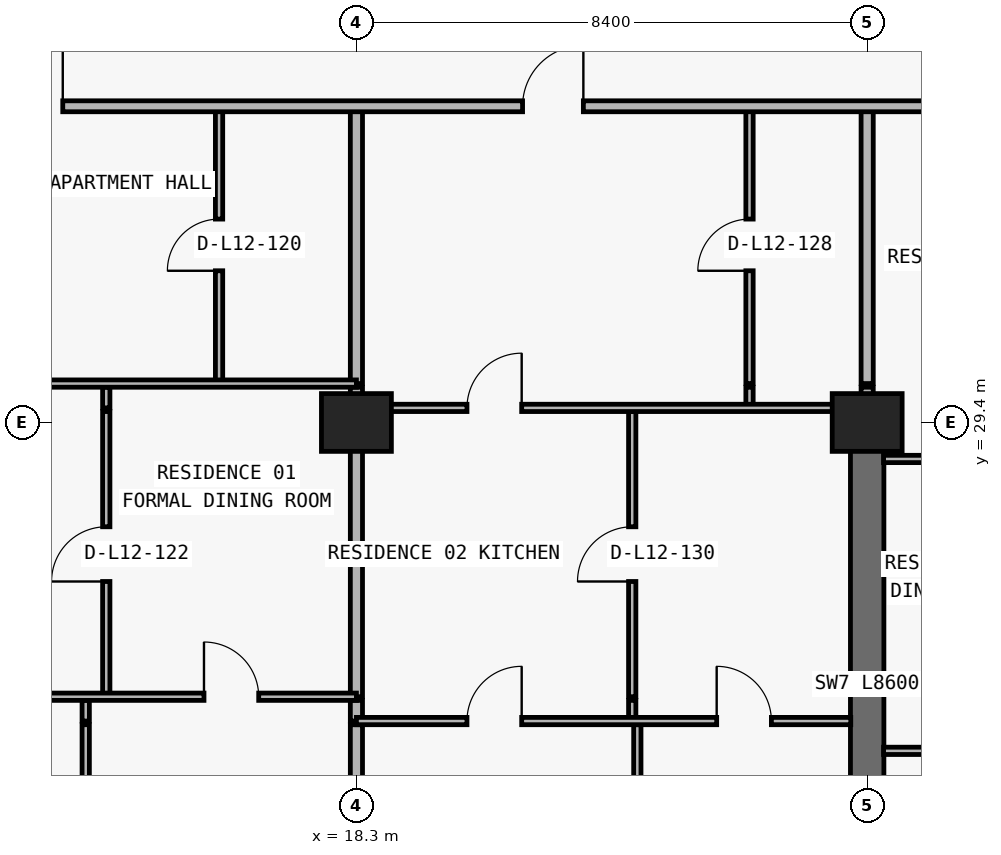
"""IFC4 building model, lengths in metres.
Left out: names, types, materials, properties, quantities, classifications, styles, units other than length and angle.
Written with IfcOpenShell. Run it as: python <this file> out.ifc"""

import sys

from ifc_helpers import new_model, si_unit, direction, frame, frame_2d, origin, origin_2d, place, context, subcontext, project, spatial, rectangle, extrude, element, fill, save


model = new_model("IFC4")
c1 = context("Model", 3, precision=1e-05, world=origin(), true_north=direction((0.0, 1.0)))
c2 = subcontext(c1, "Body", "Model", "MODEL_VIEW")
j1 = project(units=[si_unit("LENGTHUNIT", "METRE"), si_unit("PLANEANGLEUNIT", "RADIAN")], contexts=[c1])
p1 = place(None, origin())
s1 = spatial("IfcSite", under=j1, at=p1, CompositionType="ELEMENT")
p2 = place(p1, origin())
s2 = spatial("IfcBuilding", under=s1, at=p2, CompositionType="ELEMENT")
p3 = place(p2, frame((0.0, 0.0, 49.8)))
s3 = spatial("IfcBuildingStorey", under=s2, at=p3, CompositionType="ELEMENT", Elevation=49.8)
for number, where, z_axis, x_axis in (
    (1, (18.3, 29.4, 0.0), (0.0, 0.0, 1.0), (1.0, 0.0, 0.0)),
    (2, (26.7, 29.4, 0.0), (0.0, 0.0, 1.0), (1.0, 0.0, 0.0)),
):
    element("IfcColumn", number, at=place(p3, frame(where, z_axis=z_axis, x_axis=x_axis)), inside=s3, PredefinedType="COLUMN", context=c2, shape_type="SweptSolid", body=[
        extrude(rectangle(XDim=1.15, YDim=0.95, at=origin_2d()), origin(), (0.0, 0.0, 1.0), 3.05),
    ])
p4 = place(p3, frame((26.7, 20.8, 0.0), z_axis=(0.0, 0.0, 1.0), x_axis=(0.0, 1.0, 0.0)))
e3 = element("IfcWall", 3, at=p4, inside=s3, PredefinedType="SHEAR", context=c2, shape_type="SweptSolid", body=[
    extrude(rectangle(XDim=8.6, YDim=0.55, at=frame_2d((4.3, 0.0))), origin(), (0.0, 0.0, 1.0), 3.05),
])
p5 = place(p3, frame((13.848, 6.24, 0.0), z_axis=(0.0, 0.0, 1.0), x_axis=(0.0, 1.0, 0.0)))
e4 = element("IfcWall", 4, at=p5, inside=s3, PredefinedType="PARTITIONING", context=c2, shape_type="SweptSolid", body=[
    extrude(rectangle(XDim=18.19, YDim=0.12, at=frame_2d((9.095, 0.0))), origin(), (0.0, 0.0, 1.0), 3.05),
])
p6 = place(p3, frame((13.848, 24.49, 0.0), z_axis=(0.0, 0.0, 1.0), x_axis=(0.0, 1.0, 0.0)))
e5 = element("IfcWall", 5, at=p6, inside=s3, PredefinedType="PARTITIONING", context=c2, shape_type="SweptSolid", body=[
    extrude(rectangle(XDim=0.34, YDim=0.12, at=frame_2d((0.17, 0.0))), origin(), (0.0, 0.0, 1.0), 3.05),
])
p7 = place(p3, frame((14.186, 24.89, 0.0), z_axis=(0.0, 0.0, 1.0), x_axis=(0.0, 1.0, 0.0)))
e6 = element("IfcWall", 6, at=p7, inside=s3, PredefinedType="PARTITIONING", context=c2, shape_type="SweptSolid", body=[
    extrude(rectangle(XDim=4.69, YDim=0.12, at=frame_2d((2.345, 0.0))), origin(), (0.0, 0.0, 1.0), 3.05),
])
p8 = place(p7, frame((1.895, 0.0, 0.0)))
e7 = element("IfcOpeningElement", 7, at=p8, cuts=e6, PredefinedType="OPENING", context=c2, shape_type="SweptSolid", body=[
    extrude(rectangle(XDim=0.9, YDim=2.15, at=frame_2d((0.45, 1.075))), frame((0.0, 0.07, 0.0), z_axis=(0.0, -1.0, 0.0), x_axis=(1.0, 0.0, 0.0)), (0.0, 0.0, 1.0), 0.14),
])
p9 = place(p3, frame((14.186, 29.64, 0.0), z_axis=(0.0, 0.0, 1.0), x_axis=(0.0, 1.0, 0.0)))
e8 = element("IfcWall", 8, at=p9, inside=s3, PredefinedType="PARTITIONING", context=c2, shape_type="SweptSolid", body=[
    extrude(rectangle(XDim=0.34, YDim=0.12, at=frame_2d((0.17, 0.0))), origin(), (0.0, 0.0, 1.0), 3.05),
])
p10 = place(p3, frame((16.041, 30.04, 0.0), z_axis=(0.0, 0.0, 1.0), x_axis=(0.0, 1.0, 0.0)))
e9 = element("IfcWall", 9, at=p10, inside=s3, PredefinedType="PARTITIONING", context=c2, shape_type="SweptSolid", body=[
    extrude(rectangle(XDim=4.56, YDim=0.12, at=frame_2d((2.28, 0.0))), origin(), (0.0, 0.0, 1.0), 3.05),
])
p11 = place(p10, frame((1.855, 0.0, 0.0)))
e10 = element("IfcOpeningElement", 10, at=p11, cuts=e9, PredefinedType="OPENING", context=c2, shape_type="SweptSolid", body=[
    extrude(rectangle(XDim=0.85, YDim=2.1, at=frame_2d((0.425, 1.05))), frame((0.0, 0.07, 0.0), z_axis=(0.0, -1.0, 0.0), x_axis=(1.0, 0.0, 0.0)), (0.0, 0.0, 1.0), 0.14),
])
p12 = place(p3, frame((18.3, 6.24, 0.0), z_axis=(0.0, 0.0, 1.0), x_axis=(0.0, 1.0, 0.0)))
e11 = element("IfcWall", 11, at=p12, inside=s3, PredefinedType="PARTITIONING", context=c2, shape_type="SweptSolid", body=[
    extrude(rectangle(XDim=18.19, YDim=0.2, at=frame_2d((9.095, 0.0))), origin(), (0.0, 0.0, 1.0), 2.11),
])
p13 = place(p3, frame((18.3, 24.49, 0.0), z_axis=(0.0, 0.0, 1.0), x_axis=(0.0, 1.0, 0.0)))
e12 = element("IfcWall", 12, at=p13, inside=s3, PredefinedType="PARTITIONING", context=c2, shape_type="SweptSolid", body=[
    extrude(rectangle(XDim=0.34, YDim=0.2, at=frame_2d((0.17, 0.0))), origin(), (0.0, 0.0, 1.0), 2.11),
])
p14 = place(p3, frame((18.3, 24.89, 0.0), z_axis=(0.0, 0.0, 1.0), x_axis=(0.0, 1.0, 0.0)))
e13 = element("IfcWall", 13, at=p14, inside=s3, PredefinedType="PARTITIONING", context=c2, shape_type="SweptSolid", body=[
    extrude(rectangle(XDim=4.69, YDim=0.2, at=frame_2d((2.345, 0.0))), origin(), (0.0, 0.0, 1.0), 2.11),
])
p15 = place(p3, frame((18.3, 29.64, 0.0), z_axis=(0.0, 0.0, 1.0), x_axis=(0.0, 1.0, 0.0)))
e14 = element("IfcWall", 14, at=p15, inside=s3, PredefinedType="PARTITIONING", context=c2, shape_type="SweptSolid", body=[
    extrude(rectangle(XDim=0.34, YDim=0.2, at=frame_2d((0.17, 0.0))), origin(), (0.0, 0.0, 1.0), 2.11),
])
p16 = place(p3, frame((18.3, 30.04, 0.0), z_axis=(0.0, 0.0, 1.0), x_axis=(0.0, 1.0, 0.0)))
e15 = element("IfcWall", 15, at=p16, inside=s3, PredefinedType="PARTITIONING", context=c2, shape_type="SweptSolid", body=[
    extrude(rectangle(XDim=4.56, YDim=0.2, at=frame_2d((2.28, 0.0))), origin(), (0.0, 0.0, 1.0), 2.11),
])
p17 = place(p3, frame((22.836, 24.49, 0.0), z_axis=(0.0, 0.0, 1.0), x_axis=(0.0, 1.0, 0.0)))
e16 = element("IfcWall", 16, at=p17, inside=s3, PredefinedType="PARTITIONING", context=c2, shape_type="SweptSolid", body=[
    extrude(rectangle(XDim=0.34, YDim=0.12, at=frame_2d((0.17, 0.0))), origin(), (0.0, 0.0, 1.0), 3.05),
])
p18 = place(p3, frame((22.836, 24.89, 0.0), z_axis=(0.0, 0.0, 1.0), x_axis=(0.0, 1.0, 0.0)))
e17 = element("IfcWall", 17, at=p18, inside=s3, PredefinedType="PARTITIONING", context=c2, shape_type="SweptSolid", body=[
    extrude(rectangle(XDim=4.69, YDim=0.12, at=frame_2d((2.345, 0.0))), origin(), (0.0, 0.0, 1.0), 3.05),
])
p19 = place(p18, frame((1.895, 0.0, 0.0)))
e18 = element("IfcOpeningElement", 18, at=p19, cuts=e17, PredefinedType="OPENING", context=c2, shape_type="SweptSolid", body=[
    extrude(rectangle(XDim=0.9, YDim=2.15, at=frame_2d((0.45, 1.075))), frame((0.0, 0.07, 0.0), z_axis=(0.0, -1.0, 0.0), x_axis=(1.0, 0.0, 0.0)), (0.0, 0.0, 1.0), 0.14),
])
p20 = place(p3, frame((22.92, 6.24, 0.0), z_axis=(0.0, 0.0, 1.0), x_axis=(0.0, 1.0, 0.0)))
e19 = element("IfcWall", 19, at=p20, inside=s3, PredefinedType="PARTITIONING", context=c2, shape_type="SweptSolid", body=[
    extrude(rectangle(XDim=18.19, YDim=0.12, at=frame_2d((9.095, 0.0))), origin(), (0.0, 0.0, 1.0), 3.05),
])
p21 = place(p3, frame((24.765, 29.64, 0.0), z_axis=(0.0, 0.0, 1.0), x_axis=(0.0, 1.0, 0.0)))
e20 = element("IfcWall", 20, at=p21, inside=s3, PredefinedType="PARTITIONING", context=c2, shape_type="SweptSolid", body=[
    extrude(rectangle(XDim=0.34, YDim=0.12, at=frame_2d((0.17, 0.0))), origin(), (0.0, 0.0, 1.0), 3.05),
])
p22 = place(p3, frame((24.765, 30.04, 0.0), z_axis=(0.0, 0.0, 1.0), x_axis=(0.0, 1.0, 0.0)))
e21 = element("IfcWall", 21, at=p22, inside=s3, PredefinedType="PARTITIONING", context=c2, shape_type="SweptSolid", body=[
    extrude(rectangle(XDim=4.56, YDim=0.12, at=frame_2d((2.28, 0.0))), origin(), (0.0, 0.0, 1.0), 3.05),
])
p23 = place(p22, frame((1.855, 0.0, 0.0)))
e22 = element("IfcOpeningElement", 22, at=p23, cuts=e21, PredefinedType="OPENING", context=c2, shape_type="SweptSolid", body=[
    extrude(rectangle(XDim=0.85, YDim=2.1, at=frame_2d((0.425, 1.05))), frame((0.0, 0.07, 0.0), z_axis=(0.0, -1.0, 0.0), x_axis=(1.0, 0.0, 0.0)), (0.0, 0.0, 1.0), 0.14),
])
p24 = place(p3, frame((26.7, 29.64, 0.0), z_axis=(0.0, 0.0, 1.0), x_axis=(0.0, 1.0, 0.0)))
e23 = element("IfcWall", 23, at=p24, inside=s3, PredefinedType="PARTITIONING", context=c2, shape_type="SweptSolid", body=[
    extrude(rectangle(XDim=0.34, YDim=0.2, at=frame_2d((0.17, 0.0))), origin(), (0.0, 0.0, 1.0), 2.335),
])
p25 = place(p3, frame((26.7, 30.04, 0.0), z_axis=(0.0, 0.0, 1.0), x_axis=(0.0, 1.0, 0.0)))
e24 = element("IfcWall", 24, at=p25, inside=s3, PredefinedType="PARTITIONING", context=c2, shape_type="SweptSolid", body=[
    extrude(rectangle(XDim=4.56, YDim=0.2, at=frame_2d((2.28, 0.0))), origin(), (0.0, 0.0, 1.0), 2.335),
])
p26 = place(p3, frame((26.97, 24.0, 0.0), z_axis=(0.0, 0.0, 1.0), x_axis=(1.0, 0.0, 0.0)))
e25 = element("IfcWall", 25, at=p26, inside=s3, PredefinedType="PARTITIONING", context=c2, shape_type="SweptSolid", body=[
    extrude(rectangle(XDim=8.13, YDim=0.12, at=frame_2d((4.065, 0.0))), origin(), (0.0, 0.0, 1.0), 3.05),
])
p27 = place(p26, frame((1.305, 0.0, 0.0)))
e26 = element("IfcOpeningElement", 26, at=p27, cuts=e25, PredefinedType="OPENING", context=c2, shape_type="SweptSolid", body=[
    extrude(rectangle(XDim=0.9, YDim=2.15, at=frame_2d((0.45, 1.075))), frame((0.0, 0.07, 0.0), z_axis=(0.0, -1.0, 0.0), x_axis=(1.0, 0.0, 0.0)), (0.0, 0.0, 1.0), 0.14),
])
p28 = place(p3, frame((18.3, 24.49, 0.0), z_axis=(0.0, 0.0, 1.0), x_axis=(1.0, 0.0, 0.0)))
e27 = element("IfcWall", 27, at=p28, inside=s3, PredefinedType="PARTITIONING", context=c2, shape_type="SweptSolid", body=[
    extrude(rectangle(XDim=8.13, YDim=0.12, at=frame_2d((4.065, 0.0))), origin(), (0.0, 0.0, 1.0), 3.05),
])
p29 = place(p28, frame((1.818, 0.0, 0.0)))
e28 = element("IfcOpeningElement", 28, at=p29, cuts=e27, PredefinedType="OPENING", context=c2, shape_type="SweptSolid", body=[
    extrude(rectangle(XDim=0.9, YDim=2.15, at=frame_2d((0.45, 1.075))), frame((0.0, 0.07, 0.0), z_axis=(0.0, -1.0, 0.0), x_axis=(1.0, 0.0, 0.0)), (0.0, 0.0, 1.0), 0.14),
])
p30 = place(p28, frame((5.925, 0.0, 0.0)))
e29 = element("IfcOpeningElement", 29, at=p30, cuts=e27, PredefinedType="OPENING", context=c2, shape_type="SweptSolid", body=[
    extrude(rectangle(XDim=0.9, YDim=2.15, at=frame_2d((0.45, 1.075))), frame((0.0, 0.07, 0.0), z_axis=(0.0, -1.0, 0.0), x_axis=(1.0, 0.0, 0.0)), (0.0, 0.0, 1.0), 0.14),
])
p31 = place(p3, frame((9.9, 24.89, 0.0), z_axis=(0.0, 0.0, 1.0), x_axis=(1.0, 0.0, 0.0)))
e30 = element("IfcWall", 30, at=p31, inside=s3, PredefinedType="PARTITIONING", context=c2, shape_type="SweptSolid", body=[
    extrude(rectangle(XDim=8.4, YDim=0.12, at=frame_2d((4.2, 0.0))), origin(), (0.0, 0.0, 1.0), 3.05),
])
p32 = place(p31, frame((1.524, 0.0, 0.0)))
e31 = element("IfcOpeningElement", 31, at=p32, cuts=e30, PredefinedType="OPENING", context=c2, shape_type="SweptSolid", body=[
    extrude(rectangle(XDim=0.9, YDim=2.15, at=frame_2d((0.45, 1.075))), frame((0.0, 0.07, 0.0), z_axis=(0.0, -1.0, 0.0), x_axis=(1.0, 0.0, 0.0)), (0.0, 0.0, 1.0), 0.14),
])
p33 = place(p31, frame((5.893, 0.0, 0.0)))
e32 = element("IfcOpeningElement", 32, at=p33, cuts=e30, PredefinedType="OPENING", context=c2, shape_type="SweptSolid", body=[
    extrude(rectangle(XDim=0.9, YDim=2.15, at=frame_2d((0.45, 1.075))), frame((0.0, 0.07, 0.0), z_axis=(0.0, -1.0, 0.0), x_axis=(1.0, 0.0, 0.0)), (0.0, 0.0, 1.0), 0.14),
])
p34 = place(p3, frame((26.97, 28.8, 0.0), z_axis=(0.0, 0.0, 1.0), x_axis=(1.0, 0.0, 0.0)))
e33 = element("IfcWall", 33, at=p34, inside=s3, PredefinedType="PARTITIONING", context=c2, shape_type="SweptSolid", body=[
    extrude(rectangle(XDim=8.125, YDim=0.12, at=frame_2d((4.062, 0.0))), origin(), (0.0, 0.0, 1.0), 3.05),
])
p35 = place(p34, frame((1.305, 0.0, 0.0)))
e34 = element("IfcOpeningElement", 34, at=p35, cuts=e33, PredefinedType="OPENING", context=c2, shape_type="SweptSolid", body=[
    extrude(rectangle(XDim=0.9, YDim=2.15, at=frame_2d((0.45, 1.075))), frame((0.0, 0.07, 0.0), z_axis=(0.0, -1.0, 0.0), x_axis=(1.0, 0.0, 0.0)), (0.0, 0.0, 1.0), 0.14),
])
p36 = place(p3, frame((18.3, 29.64, 0.0), z_axis=(0.0, 0.0, 1.0), x_axis=(1.0, 0.0, 0.0)))
e35 = element("IfcWall", 35, at=p36, inside=s3, PredefinedType="PARTITIONING", context=c2, shape_type="SweptSolid", body=[
    extrude(rectangle(XDim=8.4, YDim=0.12, at=frame_2d((4.2, 0.0))), origin(), (0.0, 0.0, 1.0), 2.11),
])
p37 = place(p36, frame((1.818, 0.0, 0.0)))
e36 = element("IfcOpeningElement", 36, at=p37, cuts=e35, PredefinedType="OPENING", context=c2, shape_type="SweptSolid", body=[
    extrude(rectangle(XDim=0.9, YDim=2.06, at=frame_2d((0.45, 1.03))), frame((0.0, 0.07, 0.0), z_axis=(0.0, -1.0, 0.0), x_axis=(1.0, 0.0, 0.0)), (0.0, 0.0, 1.0), 0.14),
])
p38 = place(p3, frame((9.9, 30.04, 0.0), z_axis=(0.0, 0.0, 1.0), x_axis=(1.0, 0.0, 0.0)))
e37 = element("IfcWall", 37, at=p38, inside=s3, PredefinedType="PARTITIONING", context=c2, shape_type="SweptSolid", body=[
    extrude(rectangle(XDim=8.4, YDim=0.12, at=frame_2d((4.2, 0.0))), origin(), (0.0, 0.0, 1.0), 3.05),
])
p39 = place(p38, frame((1.693, 0.0, 0.0)))
e38 = element("IfcOpeningElement", 38, at=p39, cuts=e37, PredefinedType="OPENING", context=c2, shape_type="SweptSolid", body=[
    extrude(rectangle(XDim=0.9, YDim=2.15, at=frame_2d((0.45, 1.075))), frame((0.0, 0.07, 0.0), z_axis=(0.0, -1.0, 0.0), x_axis=(1.0, 0.0, 0.0)), (0.0, 0.0, 1.0), 0.14),
])
p40 = place(p3, frame((5.105, 34.6, 0.0), z_axis=(0.0, 0.0, 1.0), x_axis=(1.0, 0.0, 0.0)))
e39 = element("IfcWall", 39, at=p40, inside=s3, PredefinedType="PARTITIONING", context=c2, shape_type="SweptSolid", body=[
    extrude(rectangle(XDim=67.595, YDim=0.18, at=frame_2d((33.797, 0.0))), origin(), (0.0, 0.0, 1.0), 3.05),
])
p41 = place(p40, frame((7.365, 0.0, 0.0)))
e40 = element("IfcOpeningElement", 40, at=p41, cuts=e39, PredefinedType="OPENING", context=c2, shape_type="SweptSolid", body=[
    extrude(rectangle(XDim=1.0, YDim=2.2, at=frame_2d((0.5, 1.1))), frame((0.0, 0.1, 0.0), z_axis=(0.0, -1.0, 0.0), x_axis=(1.0, 0.0, 0.0)), (0.0, 0.0, 1.0), 0.2),
])
p42 = place(p40, frame((15.927, 0.0, 0.0)))
e41 = element("IfcOpeningElement", 41, at=p42, cuts=e39, PredefinedType="OPENING", context=c2, shape_type="SweptSolid", body=[
    extrude(rectangle(XDim=1.0, YDim=2.2, at=frame_2d((0.5, 1.1))), frame((0.0, 0.1, 0.0), z_axis=(0.0, -1.0, 0.0), x_axis=(1.0, 0.0, 0.0)), (0.0, 0.0, 1.0), 0.2),
])
p43 = place(p40, frame((24.407, 0.0, 0.0)))
e42 = element("IfcOpeningElement", 42, at=p43, cuts=e39, PredefinedType="OPENING", context=c2, shape_type="SweptSolid", body=[
    extrude(rectangle(XDim=1.0, YDim=2.2, at=frame_2d((0.5, 1.1))), frame((0.0, 0.1, 0.0), z_axis=(0.0, -1.0, 0.0), x_axis=(1.0, 0.0, 0.0)), (0.0, 0.0, 1.0), 0.2),
])
p44 = place(p40, frame((48.739, 0.0, 0.0)))
e43 = element("IfcOpeningElement", 43, at=p44, cuts=e39, PredefinedType="OPENING", context=c2, shape_type="SweptSolid", body=[
    extrude(rectangle(XDim=1.0, YDim=2.2, at=frame_2d((0.5, 1.1))), frame((0.0, 0.1, 0.0), z_axis=(0.0, -1.0, 0.0), x_axis=(1.0, 0.0, 0.0)), (0.0, 0.0, 1.0), 0.2),
])
p45 = place(p40, frame((56.98, 0.0, 0.0)))
e44 = element("IfcOpeningElement", 44, at=p45, cuts=e39, PredefinedType="OPENING", context=c2, shape_type="SweptSolid", body=[
    extrude(rectangle(XDim=1.0, YDim=2.2, at=frame_2d((0.5, 1.1))), frame((0.0, 0.1, 0.0), z_axis=(0.0, -1.0, 0.0), x_axis=(1.0, 0.0, 0.0)), (0.0, 0.0, 1.0), 0.2),
])
p46 = place(p41, origin())
e45 = element("IfcDoor", 45, at=p46, inside=s3, OperationType="SINGLE_SWING_RIGHT", PredefinedType="DOOR", context=c2, shape_type="SweptSolid", body=[
    extrude(rectangle(XDim=1.0, YDim=2.2, at=frame_2d((0.5, 1.1))), frame((0.0, 0.025, 0.0), z_axis=(0.0, -1.0, 0.0), x_axis=(1.0, 0.0, 0.0)), (0.0, 0.0, 1.0), 0.05),
])
fill(e40, e45)
p47 = place(p11, origin())
e46 = element("IfcDoor", 46, at=p47, inside=s3, OperationType="SINGLE_SWING_LEFT", PredefinedType="DOOR", context=c2, shape_type="SweptSolid", body=[
    extrude(rectangle(XDim=0.85, YDim=2.1, at=frame_2d((0.425, 1.05))), frame((0.0, 0.025, 0.0), z_axis=(0.0, -1.0, 0.0), x_axis=(1.0, 0.0, 0.0)), (0.0, 0.0, 1.0), 0.05),
])
fill(e10, e46)
p48 = place(p8, origin())
e47 = element("IfcDoor", 47, at=p48, inside=s3, OperationType="SINGLE_SWING_LEFT", PredefinedType="DOOR", context=c2, shape_type="SweptSolid", body=[
    extrude(rectangle(XDim=0.9, YDim=2.15, at=frame_2d((0.45, 1.075))), frame((0.0, 0.025, 0.0), z_axis=(0.0, -1.0, 0.0), x_axis=(1.0, 0.0, 0.0)), (0.0, 0.0, 1.0), 0.05),
])
fill(e7, e47)
p49 = place(p33, origin())
e48 = element("IfcDoor", 48, at=p49, inside=s3, OperationType="SINGLE_SWING_LEFT", PredefinedType="DOOR", context=c2, shape_type="SweptSolid", body=[
    extrude(rectangle(XDim=0.9, YDim=2.15, at=frame_2d((0.45, 1.075))), frame((0.0, 0.025, 0.0), z_axis=(0.0, -1.0, 0.0), x_axis=(1.0, 0.0, 0.0)), (0.0, 0.0, 1.0), 0.05),
])
fill(e32, e48)
p50 = place(p42, origin())
e49 = element("IfcDoor", 49, at=p50, inside=s3, OperationType="SINGLE_SWING_RIGHT", PredefinedType="DOOR", context=c2, shape_type="SweptSolid", body=[
    extrude(rectangle(XDim=1.0, YDim=2.2, at=frame_2d((0.5, 1.1))), frame((0.0, 0.025, 0.0), z_axis=(0.0, -1.0, 0.0), x_axis=(1.0, 0.0, 0.0)), (0.0, 0.0, 1.0), 0.05),
])
fill(e41, e49)
p51 = place(p23, origin())
e50 = element("IfcDoor", 50, at=p51, inside=s3, OperationType="SINGLE_SWING_LEFT", PredefinedType="DOOR", context=c2, shape_type="SweptSolid", body=[
    extrude(rectangle(XDim=0.85, YDim=2.1, at=frame_2d((0.425, 1.05))), frame((0.0, 0.025, 0.0), z_axis=(0.0, -1.0, 0.0), x_axis=(1.0, 0.0, 0.0)), (0.0, 0.0, 1.0), 0.05),
])
fill(e22, e50)
p52 = place(p37, origin())
e51 = element("IfcDoor", 51, at=p52, inside=s3, OperationType="SINGLE_SWING_RIGHT", PredefinedType="DOOR", context=c2, shape_type="SweptSolid", body=[
    extrude(rectangle(XDim=0.9, YDim=2.06, at=frame_2d((0.45, 1.03))), frame((0.0, 0.025, 0.0), z_axis=(0.0, -1.0, 0.0), x_axis=(1.0, 0.0, 0.0)), (0.0, 0.0, 1.0), 0.05),
])
fill(e36, e51)
p53 = place(p19, origin())
e52 = element("IfcDoor", 52, at=p53, inside=s3, OperationType="SINGLE_SWING_LEFT", PredefinedType="DOOR", context=c2, shape_type="SweptSolid", body=[
    extrude(rectangle(XDim=0.9, YDim=2.15, at=frame_2d((0.45, 1.075))), frame((0.0, 0.025, 0.0), z_axis=(0.0, -1.0, 0.0), x_axis=(1.0, 0.0, 0.0)), (0.0, 0.0, 1.0), 0.05),
])
fill(e18, e52)
p54 = place(p29, origin())
e53 = element("IfcDoor", 53, at=p54, inside=s3, OperationType="SINGLE_SWING_RIGHT", PredefinedType="DOOR", context=c2, shape_type="SweptSolid", body=[
    extrude(rectangle(XDim=0.9, YDim=2.15, at=frame_2d((0.45, 1.075))), frame((0.0, 0.025, 0.0), z_axis=(0.0, -1.0, 0.0), x_axis=(1.0, 0.0, 0.0)), (0.0, 0.0, 1.0), 0.05),
])
fill(e28, e53)
p55 = place(p30, origin())
e54 = element("IfcDoor", 54, at=p55, inside=s3, OperationType="SINGLE_SWING_LEFT", PredefinedType="DOOR", context=c2, shape_type="SweptSolid", body=[
    extrude(rectangle(XDim=0.9, YDim=2.15, at=frame_2d((0.45, 1.075))), frame((0.0, 0.025, 0.0), z_axis=(0.0, -1.0, 0.0), x_axis=(1.0, 0.0, 0.0)), (0.0, 0.0, 1.0), 0.05),
])
fill(e29, e54)
save(model, sys.argv[1])
